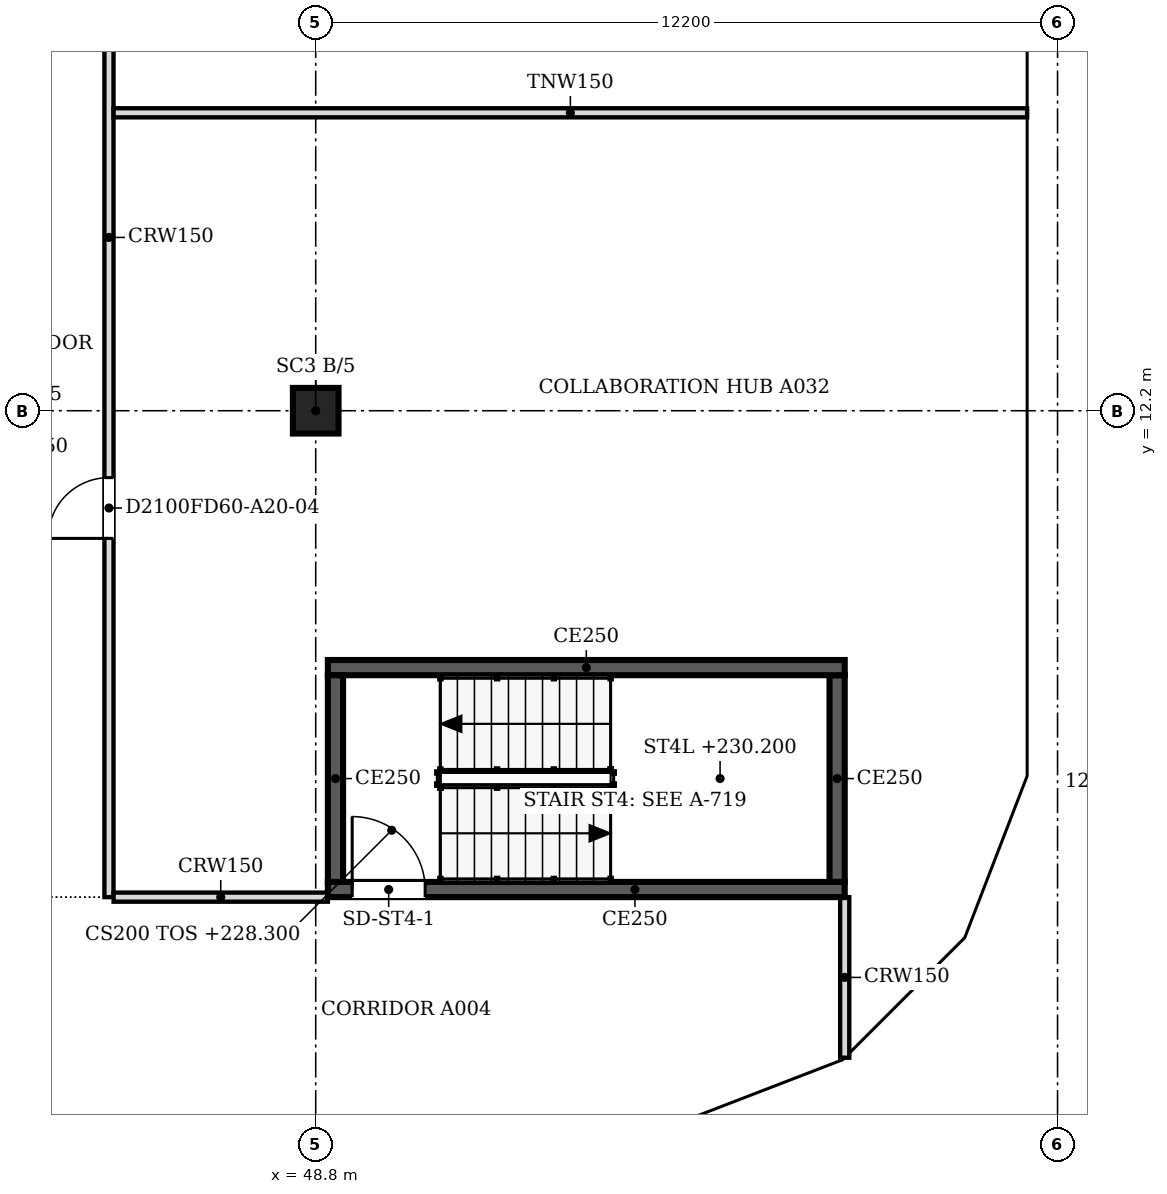
"""IFC4 building model, lengths in metres.
Left out: names, types, materials, properties, quantities, classifications, styles, units other than length and angle.
Written with IfcOpenShell. Run it as: python <this file> out.ifc"""

import sys

from ifc_helpers import new_model, si_unit, direction, frame, frame_2d, origin, origin_2d, place, context, subcontext, project, spatial, polyline, rectangle, outline, extrude, faceted_brep, source, transform, mapped, element, fill, save


model = new_model("IFC4")
c1 = context("Model", 3, precision=1e-05, world=origin(), true_north=direction((0.0, 1.0)))
c2 = subcontext(c1, "Body", "Model", "MODEL_VIEW")
j1 = project(units=[si_unit("LENGTHUNIT", "METRE"), si_unit("PLANEANGLEUNIT", "RADIAN")], contexts=[c1])
p1 = place(None, origin())
s1 = spatial("IfcSite", under=j1, at=p1, CompositionType="ELEMENT")
p2 = place(p1, origin())
s2 = spatial("IfcBuilding", under=s1, at=p2, CompositionType="ELEMENT")
p3 = place(p2, frame((0.0, 0.0, 228.3)))
s3 = spatial("IfcBuildingStorey", under=s2, at=p3, CompositionType="ELEMENT", Elevation=228.3)
p4 = place(p3, frame((48.8, 12.2, 0.0), z_axis=(0.0, 0.0, 1.0), x_axis=(1.0, 0.0, 0.0)))
e1 = element("IfcColumn", 1, at=p4, inside=s3, PredefinedType="COLUMN", context=c2, shape_type="SweptSolid", body=[
    extrude(rectangle(XDim=0.75, YDim=0.75, at=origin_2d()), origin(), (0.0, 0.0, 1.0), 3.5),
])
m1 = source(origin(), c2, "Body", "Brep", [
    faceted_brep([(0.047, -0.25, 0.0), (2.997, -0.25, 3.8), (0.047, -0.25, 7.6), (0.0, -0.25, 7.541), (0.0, -0.25, 0.059), (0.093, 0.25, 7.54), (2.944, 0.25, 3.868), (2.944, 0.25, 3.732), (0.093, 0.25, 0.06), (2.997, 0.0, 3.8), (0.047, 0.0, 0.0), (0.047, 0.0, 7.6)], [[[0, 1, 2, 3, 4]], [[5, 6, 7, 8]], [[8, 7, 9, 1, 0, 10]], [[6, 5, 11, 2, 1, 9]], [[3, 2, 11]], [[10, 0, 4]], [[8, 10, 4, 3, 11, 5]], [[9, 7, 6]]]),
])
p5 = place(p3, frame((54.81, 0.233, -3.8), z_axis=(0.0, 0.0, 1.0), x_axis=(0.932990326376, 0.359901446078, 0.0)))
e2 = element("IfcWall", 2, at=p5, inside=s3, PredefinedType="SOLIDWALL", context=c2, shape_type="MappedRepresentation", body=[
    mapped(m1, transform((0.0, 0.0, 0.0), scale=1.0)),
])
m2 = source(origin(), c2, "Body", "SweptSolid", [
    extrude(outline(polyline([(0.247, 0.665), (2.681, 3.8), (0.247, 6.935), (0.247, 0.665)])), frame((0.0, 0.26, 0.0), z_axis=(0.0, -1.0, 0.0), x_axis=(1.0, 0.0, 0.0)), (0.0, 0.0, 1.0), 0.52),
])
p6 = place(p5, origin())
e3 = element("IfcOpeningElement", 3, at=p6, cuts=e2, PredefinedType="OPENING", context=c2, shape_type="MappedRepresentation", body=[
    mapped(m2, transform((0.0, 0.0, 0.0), scale=1.0)),
])
m3 = source(origin(), c2, "Body", "Brep", [
    faceted_brep([(2.944, -0.25, 0.0), (2.997, -0.25, 0.068), (2.997, -0.25, 7.532), (2.944, -0.25, 7.6), (0.0, -0.25, 3.8), (0.053, 0.25, 3.868), (2.891, 0.25, 7.532), (2.891, 0.25, 0.068), (0.053, 0.25, 3.732), (2.944, 0.0, 0.0), (2.944, 0.0, 7.6), (0.0, 0.0, 3.8)], [[[0, 1, 2, 3, 4]], [[5, 6, 7, 8]], [[1, 0, 9]], [[10, 3, 2]], [[6, 5, 11, 4, 3, 10]], [[8, 7, 9, 0, 4, 11]], [[8, 11, 5]], [[1, 9, 7, 6, 10, 2]]]),
])
p7 = place(p3, frame((57.606, 1.312, -3.8), z_axis=(0.0, 0.0, 1.0), x_axis=(0.707147509625, 0.707066050402, 0.0)))
e4 = element("IfcWall", 4, at=p7, inside=s3, PredefinedType="SOLIDWALL", context=c2, shape_type="MappedRepresentation", body=[
    mapped(m3, transform((0.0, 0.0, 0.0), scale=1.0)),
])
m4 = source(origin(), c2, "Body", "SweptSolid", [
    extrude(outline(polyline([(2.744, 6.934), (0.316, 3.8), (2.744, 0.666), (2.744, 6.934)])), frame((0.0, 0.26, 0.0), z_axis=(0.0, -1.0, 0.0), x_axis=(1.0, 0.0, 0.0)), (0.0, 0.0, 1.0), 0.52),
])
p8 = place(p7, origin())
e5 = element("IfcOpeningElement", 5, at=p8, cuts=e4, PredefinedType="OPENING", context=c2, shape_type="MappedRepresentation", body=[
    mapped(m4, transform((0.0, 0.0, 0.0), scale=1.0)),
])
m5 = source(origin(), c2, "Body", "Brep", [
    faceted_brep([(0.053, -0.25, 0.0), (3.003, -0.25, 3.8), (0.053, -0.25, 7.6), (0.0, -0.25, 7.532), (0.0, -0.25, 0.068), (0.106, 0.25, 7.532), (2.957, 0.25, 3.86), (2.957, 0.25, 3.74), (0.106, 0.25, 0.068), (3.003, 0.0, 3.8), (0.053, 0.0, 0.0), (0.053, 0.0, 7.6)], [[[0, 1, 2, 3, 4]], [[5, 6, 7, 8]], [[8, 7, 9, 1, 0, 10]], [[6, 5, 11, 2, 1, 9]], [[3, 2, 11]], [[10, 0, 4]], [[8, 10, 4, 3, 11, 5]], [[9, 7, 6]]]),
])
p9 = place(p3, frame((59.669, 3.344, -3.8), z_axis=(0.0, 0.0, 1.0), x_axis=(0.35992665181, 0.932980602862, 0.0)))
e6 = element("IfcWall", 6, at=p9, inside=s3, PredefinedType="SOLIDWALL", context=c2, shape_type="MappedRepresentation", body=[
    mapped(m5, transform((0.0, 0.0, 0.0), scale=1.0)),
])
m6 = source(origin(), c2, "Body", "SweptSolid", [
    extrude(outline(polyline([(0.253, 0.665), (2.687, 3.8), (0.253, 6.935), (0.253, 0.665)])), frame((0.0, 0.26, 0.0), z_axis=(0.0, -1.0, 0.0), x_axis=(1.0, 0.0, 0.0)), (0.0, 0.0, 1.0), 0.52),
])
p10 = place(p9, origin())
e7 = element("IfcOpeningElement", 7, at=p10, cuts=e6, PredefinedType="OPENING", context=c2, shape_type="MappedRepresentation", body=[
    mapped(m6, transform((0.0, 0.0, 0.0), scale=1.0)),
])
m7 = source(origin(), c2, "Body", "Brep", [
    faceted_brep([(3.003, -0.25, 0.0), (6.053, -0.25, 3.8), (3.003, -0.25, 7.6), (0.0, -0.25, 3.8), (0.047, 0.25, 3.859), (3.003, 0.25, 7.6), (6.053, 0.25, 3.8), (3.003, 0.25, 0.0), (0.047, 0.25, 3.741), (0.0, 0.0, 3.8)], [[[0, 1, 2, 3]], [[4, 5, 6, 7, 8]], [[7, 6, 1, 0]], [[6, 5, 2, 1]], [[5, 4, 9, 3, 2]], [[8, 7, 0, 3, 9]], [[8, 9, 4]]]),
])
p11 = place(p3, frame((60.75, 6.146, -3.8), z_axis=(0.0, 0.0, 1.0), x_axis=(0.0, 1.0, 0.0)))
e8 = element("IfcWall", 8, at=p11, inside=s3, PredefinedType="SOLIDWALL", context=c2, shape_type="MappedRepresentation", body=[
    mapped(m7, transform((0.0, 0.0, 0.0), scale=1.0)),
])
m8 = source(origin(), c2, "Body", "SweptSolid", [
    extrude(outline(polyline([(3.005, 0.401), (5.733, 3.8), (3.005, 7.199), (0.319, 3.8), (3.005, 0.401)])), frame((0.0, 0.26, 0.0), z_axis=(0.0, -1.0, 0.0), x_axis=(1.0, 0.0, 0.0)), (0.0, 0.0, 1.0), 0.52),
])
p12 = place(p11, origin())
e9 = element("IfcOpeningElement", 9, at=p12, cuts=e8, PredefinedType="OPENING", context=c2, shape_type="MappedRepresentation", body=[
    mapped(m8, transform((0.0, 0.0, 0.0), scale=1.0)),
])
m9 = source(origin(), c2, "Body", "SweptSolid", [
    extrude(outline(polyline([(3.05, 0.0), (6.1, 3.8), (3.05, 7.6), (0.0, 3.8), (3.05, 0.0)])), frame((0.0, 0.25, 0.0), z_axis=(0.0, -1.0, 0.0), x_axis=(1.0, 0.0, 0.0)), (0.0, 0.0, 1.0), 0.5),
])
p13 = place(p3, frame((60.75, 12.2, -3.8), z_axis=(0.0, 0.0, 1.0), x_axis=(0.0, 1.0, 0.0)))
e10 = element("IfcWall", 10, at=p13, inside=s3, PredefinedType="SOLIDWALL", context=c2, shape_type="MappedRepresentation", body=[
    mapped(m9, transform((0.0, 0.0, 0.0), scale=1.0)),
])
m10 = source(origin(), c2, "Body", "SweptSolid", [
    extrude(outline(polyline([(3.05, 0.399), (5.78, 3.8), (3.05, 7.201), (0.321, 3.8), (3.05, 0.399)])), frame((0.0, 0.26, 0.0), z_axis=(0.0, -1.0, 0.0), x_axis=(1.0, 0.0, 0.0)), (0.0, 0.0, 1.0), 0.52),
])
p14 = place(p13, origin())
e11 = element("IfcOpeningElement", 11, at=p14, cuts=e10, PredefinedType="OPENING", context=c2, shape_type="MappedRepresentation", body=[
    mapped(m10, transform((0.0, 0.0, 0.0), scale=1.0)),
])
m11 = source(origin(), c2, "Body", "Brep", [
    faceted_brep([(2.95, -0.25, 0.0), (3.003, -0.25, 0.068), (3.003, -0.25, 3.8), (0.0, -0.25, 3.8), (0.047, 0.25, 3.8), (2.898, 0.25, 3.8), (2.898, 0.25, 0.068), (0.047, 0.25, 3.74), (2.95, 0.0, 0.0), (0.0, 0.0, 3.8)], [[[0, 1, 2, 3]], [[4, 5, 6, 7]], [[1, 0, 8]], [[5, 4, 9, 3, 2]], [[7, 6, 8, 0, 3, 9]], [[7, 9, 4]], [[1, 8, 6, 5, 2]]]),
])
p15 = place(p3, frame((54.854, 0.25, 0.0), z_axis=(0.0, 0.0, 1.0), x_axis=(0.932970071518, 0.359953949349, 0.0)))
e12 = element("IfcWall", 12, at=p15, inside=s3, PredefinedType="SOLIDWALL", context=c2, shape_type="MappedRepresentation", body=[
    mapped(m11, transform((0.0, 0.0, 0.0), scale=1.0)),
])
m12 = source(origin(), c2, "Body", "SweptSolid", [
    extrude(outline(polyline([(2.75, 3.55), (0.511, 3.55), (2.75, 0.665), (2.75, 3.55)])), frame((0.0, 0.26, 0.0), z_axis=(0.0, -1.0, 0.0), x_axis=(1.0, 0.0, 0.0)), (0.0, 0.0, 1.0), 0.52),
])
p16 = place(p15, origin())
e13 = element("IfcOpeningElement", 13, at=p16, cuts=e12, PredefinedType="OPENING", context=c2, shape_type="MappedRepresentation", body=[
    mapped(m12, transform((0.0, 0.0, 0.0), scale=1.0)),
])
m13 = source(origin(), c2, "Body", "Brep", [
    faceted_brep([(0.053, -0.25, 0.0), (2.997, -0.25, 3.8), (0.0, -0.25, 3.8), (0.0, -0.25, 0.068), (0.106, 0.25, 3.8), (2.944, 0.25, 3.8), (2.944, 0.25, 3.732), (0.106, 0.25, 0.068), (2.997, 0.0, 3.8), (0.053, 0.0, 0.0)], [[[0, 1, 2, 3]], [[4, 5, 6, 7]], [[7, 6, 8, 1, 0, 9]], [[5, 4, 2, 1, 8]], [[9, 0, 3]], [[7, 9, 3, 2, 4]], [[6, 5, 8]]]),
])
p17 = place(p3, frame((57.569, 1.274, 0.0), z_axis=(0.0, 0.0, 1.0), x_axis=(0.707066050402, 0.707147509625, 0.0)))
e14 = element("IfcWall", 14, at=p17, inside=s3, PredefinedType="SOLIDWALL", context=c2, shape_type="MappedRepresentation", body=[
    mapped(m13, transform((0.0, 0.0, 0.0), scale=1.0)),
])
m14 = source(origin(), c2, "Body", "SweptSolid", [
    extrude(outline(polyline([(0.253, 0.666), (2.487, 3.55), (0.253, 3.55), (0.253, 0.666)])), frame((0.0, 0.26, 0.0), z_axis=(0.0, -1.0, 0.0), x_axis=(1.0, 0.0, 0.0)), (0.0, 0.0, 1.0), 0.52),
])
p18 = place(p17, origin())
e15 = element("IfcOpeningElement", 15, at=p18, cuts=e14, PredefinedType="OPENING", context=c2, shape_type="MappedRepresentation", body=[
    mapped(m14, transform((0.0, 0.0, 0.0), scale=1.0)),
])
m15 = source(origin(), c2, "Body", "Brep", [
    faceted_brep([(2.95, -0.25, 0.0), (2.997, -0.25, 0.059), (2.997, -0.25, 3.8), (0.0, -0.25, 3.8), (0.053, 0.25, 3.8), (2.904, 0.25, 3.8), (2.904, 0.25, 0.06), (0.053, 0.25, 3.732), (2.95, 0.0, 0.0), (0.0, 0.0, 3.8)], [[[0, 1, 2, 3]], [[4, 5, 6, 7]], [[1, 0, 8]], [[5, 4, 9, 3, 2]], [[7, 6, 8, 0, 3, 9]], [[7, 9, 4]], [[1, 8, 6, 5, 2]]]),
])
p19 = place(p3, frame((59.688, 3.394, 0.0), z_axis=(0.0, 0.0, 1.0), x_axis=(0.359972353723, 0.932962970624, 0.0)))
e16 = element("IfcWall", 16, at=p19, inside=s3, PredefinedType="SOLIDWALL", context=c2, shape_type="MappedRepresentation", body=[
    mapped(m15, transform((0.0, 0.0, 0.0), scale=1.0)),
])
p20 = place(p19, origin())
e17 = element("IfcOpeningElement", 17, at=p20, cuts=e16, PredefinedType="OPENING", context=c2, shape_type="MappedRepresentation", body=[
    mapped(m12, transform((0.0, 0.0, 0.0), scale=1.0)),
])
m16 = source(origin(), c2, "Body", "Brep", [
    faceted_brep([(0.047, -0.25, 0.0), (3.05, -0.25, 3.8), (0.0, -0.25, 3.8), (0.0, -0.25, 0.06), (0.093, 0.25, 3.8), (3.05, 0.25, 3.8), (0.093, 0.25, 0.059), (0.047, 0.0, 0.0)], [[[0, 1, 2, 3]], [[4, 5, 6]], [[6, 5, 1, 0, 7]], [[5, 4, 2, 1]], [[7, 0, 3]], [[6, 7, 3, 2, 4]]]),
])
p21 = place(p3, frame((60.75, 6.1, 0.0), z_axis=(0.0, 0.0, 1.0), x_axis=(0.0, 1.0, 0.0)))
e18 = element("IfcWall", 18, at=p21, inside=s3, PredefinedType="SOLIDWALL", context=c2, shape_type="MappedRepresentation", body=[
    mapped(m16, transform((0.0, 0.0, 0.0), scale=1.0)),
])
m17 = source(origin(), c2, "Body", "SweptSolid", [
    extrude(outline(polyline([(0.247, 0.656), (2.534, 3.55), (0.247, 3.55), (0.247, 0.656)])), frame((0.0, 0.26, 0.0), z_axis=(0.0, -1.0, 0.0), x_axis=(1.0, 0.0, 0.0)), (0.0, 0.0, 1.0), 0.52),
])
p22 = place(p21, origin())
e19 = element("IfcOpeningElement", 19, at=p22, cuts=e18, PredefinedType="OPENING", context=c2, shape_type="MappedRepresentation", body=[
    mapped(m17, transform((0.0, 0.0, 0.0), scale=1.0)),
])
m18 = source(origin(), c2, "Body", "SweptSolid", [
    extrude(outline(polyline([(3.05, 0.0), (6.1, 3.8), (0.0, 3.8), (3.05, 0.0)])), frame((0.0, 0.25, 0.0), z_axis=(0.0, -1.0, 0.0), x_axis=(1.0, 0.0, 0.0)), (0.0, 0.0, 1.0), 0.5),
])
p23 = place(p3, frame((60.75, 9.15, 0.0), z_axis=(0.0, 0.0, 1.0), x_axis=(0.0, 1.0, 0.0)))
e20 = element("IfcWall", 20, at=p23, inside=s3, PredefinedType="SOLIDWALL", context=c2, shape_type="MappedRepresentation", body=[
    mapped(m18, transform((0.0, 0.0, 0.0), scale=1.0)),
])
m19 = source(origin(), c2, "Body", "SweptSolid", [
    extrude(outline(polyline([(3.05, 0.399), (5.579, 3.55), (0.521, 3.55), (3.05, 0.399)])), frame((0.0, 0.26, 0.0), z_axis=(0.0, -1.0, 0.0), x_axis=(1.0, 0.0, 0.0)), (0.0, 0.0, 1.0), 0.52),
])
p24 = place(p23, origin())
e21 = element("IfcOpeningElement", 21, at=p24, cuts=e20, PredefinedType="OPENING", context=c2, shape_type="MappedRepresentation", body=[
    mapped(m19, transform((0.0, 0.0, 0.0), scale=1.0)),
])
p25 = place(p3, frame((60.75, 15.25, 0.0), z_axis=(0.0, 0.0, 1.0), x_axis=(0.0, 1.0, 0.0)))
e22 = element("IfcWall", 22, at=p25, inside=s3, PredefinedType="SOLIDWALL", context=c2, shape_type="MappedRepresentation", body=[
    mapped(m18, transform((0.0, 0.0, 0.0), scale=1.0)),
])
p26 = place(p25, origin())
e23 = element("IfcOpeningElement", 23, at=p26, cuts=e22, PredefinedType="OPENING", context=c2, shape_type="MappedRepresentation", body=[
    mapped(m19, transform((0.0, 0.0, 0.0), scale=1.0)),
])
p27 = place(p3, frame((57.5, 4.325, 0.0), z_axis=(0.0, 0.0, 1.0), x_axis=(-1.0, 0.0, 0.0)))
e24 = element("IfcWall", 24, at=p27, inside=s3, PredefinedType="SOLIDWALL", context=c2, shape_type="SweptSolid", body=[
    extrude(rectangle(XDim=8.5, YDim=0.25, at=frame_2d((4.25, 0.0))), origin(), (0.0, 0.0, 1.0), 3.8),
])
m20 = source(origin(), c2, "Body", "SweptSolid", [
    extrude(rectangle(XDim=1.2, YDim=2.1, at=frame_2d((0.6, 1.05))), frame((0.0, 0.135, 0.0), z_axis=(0.0, -1.0, 0.0), x_axis=(1.0, 0.0, 0.0)), (0.0, 0.0, 1.0), 0.27),
])
p28 = place(p27, frame((6.9, 0.0, 0.0)))
e25 = element("IfcOpeningElement", 25, at=p28, cuts=e24, PredefinedType="OPENING", context=c2, shape_type="MappedRepresentation", body=[
    mapped(m20, transform((0.0, 0.0, 0.0), scale=1.0)),
])
p29 = place(p3, frame((49.125, 4.45, 0.0), z_axis=(0.0, 0.0, 1.0), x_axis=(0.0, 1.0, 0.0)))
e26 = element("IfcWall", 26, at=p29, inside=s3, PredefinedType="SOLIDWALL", context=c2, shape_type="SweptSolid", body=[
    extrude(rectangle(XDim=3.4, YDim=0.25, at=frame_2d((1.7, 0.0))), origin(), (0.0, 0.0, 1.0), 3.8),
])
p30 = place(p3, frame((49.0, 7.975, 0.0), z_axis=(0.0, 0.0, 1.0), x_axis=(1.0, 0.0, 0.0)))
e27 = element("IfcWall", 27, at=p30, inside=s3, PredefinedType="SOLIDWALL", context=c2, shape_type="SweptSolid", body=[
    extrude(rectangle(XDim=8.5, YDim=0.25, at=frame_2d((4.25, 0.0))), origin(), (0.0, 0.0, 1.0), 3.8),
])
p31 = place(p3, frame((57.375, 7.85, 0.0), z_axis=(0.0, 0.0, 1.0), x_axis=(0.0, -1.0, 0.0)))
e28 = element("IfcWall", 28, at=p31, inside=s3, PredefinedType="SOLIDWALL", context=c2, shape_type="SweptSolid", body=[
    extrude(rectangle(XDim=3.4, YDim=0.25, at=frame_2d((1.7, 0.0))), origin(), (0.0, 0.0, 1.0), 3.8),
])
p32 = place(p3, frame((57.5, 1.559, 0.0), z_axis=(0.0, 0.0, 1.0), x_axis=(0.0, 1.0, 0.0)))
e29 = element("IfcWall", 29, at=p32, inside=s3, PredefinedType="PARTITIONING", context=c2, shape_type="SweptSolid", body=[
    extrude(rectangle(XDim=2.641, YDim=0.15, at=frame_2d((1.32, 0.0))), origin(), (0.0, 0.0, 1.0), 2.888),
])
p33 = place(p3, frame((45.4, 21.924, 0.0), z_axis=(0.0, 0.0, 1.0), x_axis=(0.0, -1.0, 0.0)))
e30 = element("IfcWall", 30, at=p33, inside=s3, PredefinedType="PARTITIONING", context=c2, shape_type="SweptSolid", body=[
    extrude(rectangle(XDim=17.724, YDim=0.15, at=frame_2d((8.862, 0.0))), origin(), (0.0, 0.0, 1.0), 2.888),
])
m21 = source(origin(), c2, "Body", "SweptSolid", [
    extrude(rectangle(XDim=1.0, YDim=2.1, at=frame_2d((0.5, 1.05))), frame((0.0, 0.085, 0.0), z_axis=(0.0, -1.0, 0.0), x_axis=(1.0, 0.0, 0.0)), (0.0, 0.0, 1.0), 0.17),
])
p34 = place(p33, frame((1.923, 0.0, 0.0)))
e31 = element("IfcOpeningElement", 31, at=p34, cuts=e30, PredefinedType="OPENING", context=c2, shape_type="MappedRepresentation", body=[
    mapped(m21, transform((0.0, 0.0, 0.0), scale=1.0)),
])
p35 = place(p33, frame((10.824, 0.0, 0.0)))
e32 = element("IfcOpeningElement", 32, at=p35, cuts=e30, PredefinedType="OPENING", context=c2, shape_type="MappedRepresentation", body=[
    mapped(m21, transform((0.0, 0.0, 0.0), scale=1.0)),
])
p36 = place(p3, frame((45.476, 4.2, 0.0), z_axis=(0.0, 0.0, 1.0), x_axis=(1.0, 0.0, 0.0)))
e33 = element("IfcWall", 33, at=p36, inside=s3, PredefinedType="PARTITIONING", context=c2, shape_type="SweptSolid", body=[
    extrude(rectangle(XDim=3.524, YDim=0.15, at=frame_2d((1.762, 0.0))), origin(), (0.0, 0.0, 1.0), 2.888),
])
p37 = place(p3, frame((45.476, 17.1, 0.0), z_axis=(0.0, 0.0, 1.0), x_axis=(1.0, 0.0, 0.0)))
e34 = element("IfcWall", 34, at=p37, inside=s3, PredefinedType="PARTITIONING", context=c2, shape_type="SweptSolid", body=[
    extrude(rectangle(XDim=15.024, YDim=0.15, at=frame_2d((7.512, 0.0))), origin(), (0.0, 0.0, 1.0), 2.888),
])
m22 = source(origin(), c2, "Body", "SweptSolid", [
    extrude(rectangle(XDim=1.2, YDim=2.1, at=frame_2d((0.6, 1.05))), frame((0.0, 0.025, 0.0), z_axis=(0.0, -1.0, 0.0), x_axis=(1.0, 0.0, 0.0)), (0.0, 0.0, 1.0), 0.05),
])
p38 = place(p28, origin())
e35 = element("IfcDoor", 35, at=p38, inside=s3, OperationType="SINGLE_SWING_RIGHT", PredefinedType="DOOR", context=c2, shape_type="MappedRepresentation", body=[
    mapped(m22, transform((0.0, 0.0, 0.0), scale=1.0)),
])
fill(e25, e35)
m23 = source(origin(), c2, "Body", "SweptSolid", [
    extrude(rectangle(XDim=1.0, YDim=2.1, at=frame_2d((0.5, 1.05))), frame((0.0, 0.025, 0.0), z_axis=(0.0, -1.0, 0.0), x_axis=(1.0, 0.0, 0.0)), (0.0, 0.0, 1.0), 0.05),
])
p39 = place(p35, origin())
e36 = element("IfcDoor", 36, at=p39, inside=s3, OperationType="SINGLE_SWING_RIGHT", PredefinedType="DOOR", context=c2, shape_type="MappedRepresentation", body=[
    mapped(m23, transform((0.0, 0.0, 0.0), scale=1.0)),
])
fill(e32, e36)
save(model, sys.argv[1])
